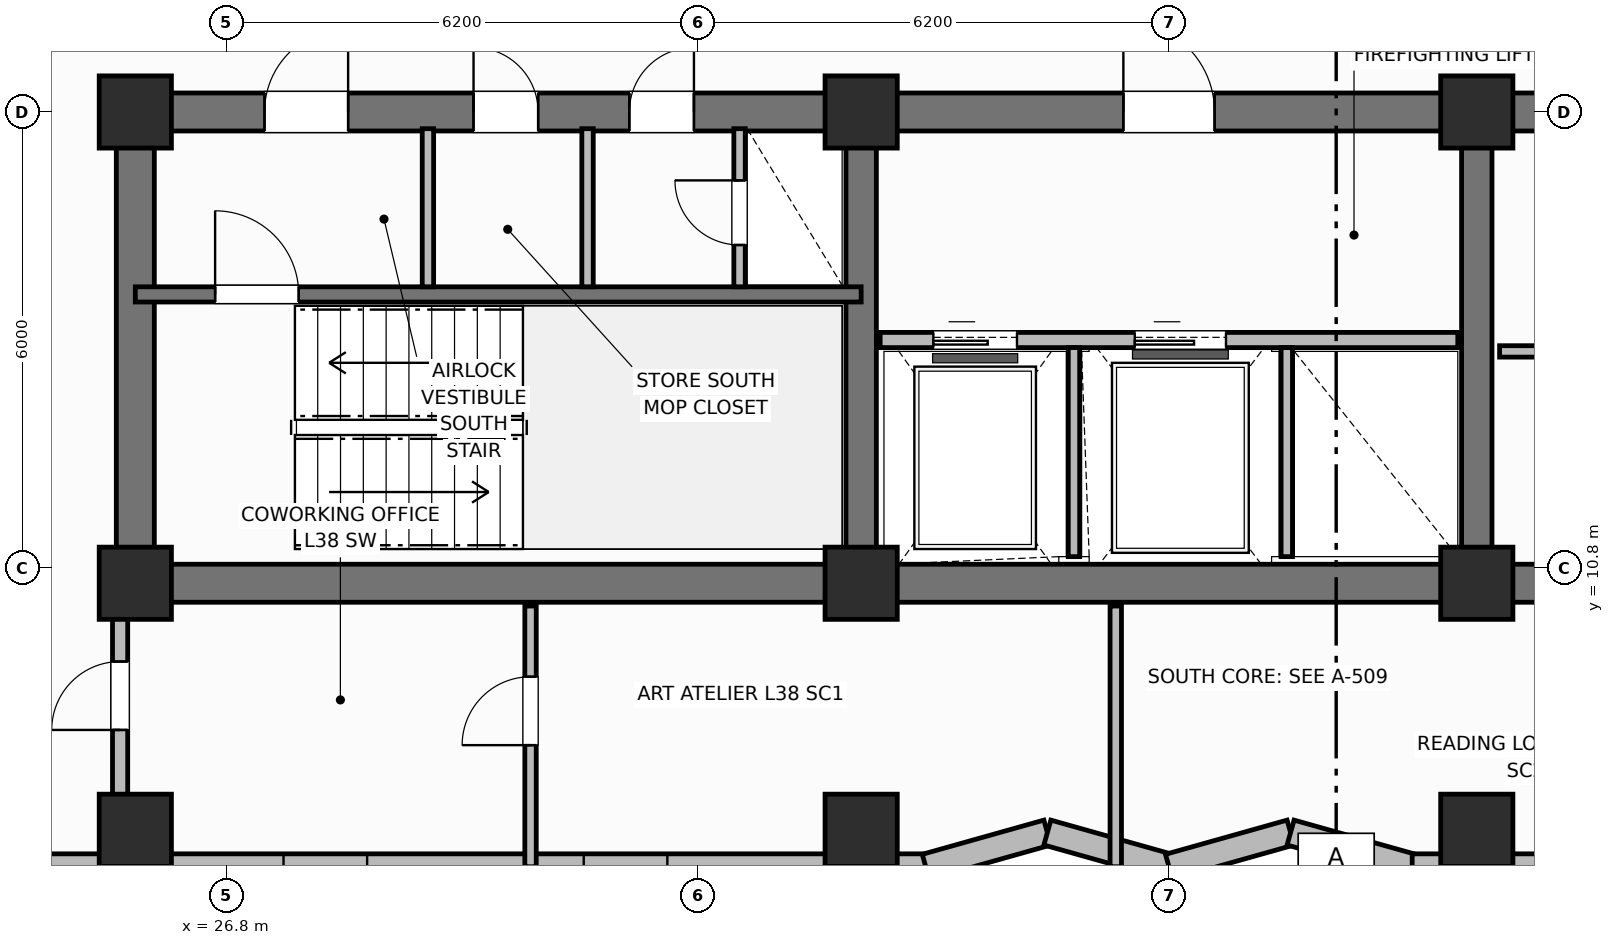
"""IFC4 building model, lengths in metres.
Left out: names, types, materials, properties, quantities, classifications, styles, units other than length and angle.
Written with IfcOpenShell. Run it as: python <this file> out.ifc"""

import sys

from ifc_helpers import new_model, si_unit, direction, frame, frame_2d, origin, origin_2d, place, context, subcontext, project, spatial, rectangle, extrude, element, fill, save


model = new_model("IFC4")
c1 = context("Model", 3, precision=1e-05, world=origin(), true_north=direction((0.0, 1.0)))
c2 = subcontext(c1, "Body", "Model", "MODEL_VIEW")
j1 = project(units=[si_unit("LENGTHUNIT", "METRE"), si_unit("PLANEANGLEUNIT", "RADIAN")], contexts=[c1])
p1 = place(None, origin())
s1 = spatial("IfcSite", under=j1, at=p1, CompositionType="ELEMENT")
p2 = place(p1, origin())
s2 = spatial("IfcBuilding", under=s1, at=p2, CompositionType="ELEMENT")
p3 = place(p2, frame((0.0, 0.0, 155.2)))
s3 = spatial("IfcBuildingStorey", under=s2, at=p3, CompositionType="ELEMENT", Elevation=155.2)
p4 = place(p3, frame((52.8, 10.6, 0.0), z_axis=(0.0, 0.0, 1.0), x_axis=(-1.0, 0.0, 0.0)))
e1 = element("IfcWall", 1, at=p4, inside=s3, PredefinedType="SHEAR", context=c2, shape_type="SweptSolid", body=[
    extrude(rectangle(XDim=27.2, YDim=0.5, at=frame_2d((13.6, 0.0))), origin(), (0.0, 0.0, 1.0), 3.7),
])
p5 = place(p3, frame((25.6, 10.85, 0.0), z_axis=(0.0, 0.0, 1.0), x_axis=(0.0, 1.0, 0.0)))
e2 = element("IfcWall", 2, at=p5, inside=s3, PredefinedType="SHEAR", context=c2, shape_type="SweptSolid", body=[
    extrude(rectangle(XDim=5.7, YDim=0.5, at=frame_2d((2.85, 0.0))), origin(), (0.0, 0.0, 1.0), 3.7),
])
p6 = place(p3, frame((25.6, 16.8, 0.0), z_axis=(0.0, 0.0, 1.0), x_axis=(1.0, 0.0, 0.0)))
e3 = element("IfcWall", 3, at=p6, inside=s3, PredefinedType="SHEAR", context=c2, shape_type="SweptSolid", body=[
    extrude(rectangle(XDim=27.2, YDim=0.5, at=frame_2d((13.6, 0.0))), origin(), (0.0, 0.0, 1.0), 3.7),
])
p7 = place(p6, frame((1.7, 0.0, 0.0)))
e4 = element("IfcOpeningElement", 4, at=p7, cuts=e3, PredefinedType="OPENING", context=c2, shape_type="SweptSolid", body=[
    extrude(rectangle(XDim=1.1, YDim=2.15, at=frame_2d((0.55, 1.075))), frame((0.0, 0.26, 0.0), z_axis=(0.0, -1.0, 0.0), x_axis=(1.0, 0.0, 0.0)), (0.0, 0.0, 1.0), 0.52),
])
p8 = place(p6, frame((4.45, 0.0, 0.0)))
e5 = element("IfcOpeningElement", 5, at=p8, cuts=e3, PredefinedType="OPENING", context=c2, shape_type="SweptSolid", body=[
    extrude(rectangle(XDim=0.85, YDim=2.1, at=frame_2d((0.425, 1.05))), frame((0.0, 0.26, 0.0), z_axis=(0.0, -1.0, 0.0), x_axis=(1.0, 0.0, 0.0)), (0.0, 0.0, 1.0), 0.52),
])
p9 = place(p6, frame((6.5, 0.0, 0.0)))
e6 = element("IfcOpeningElement", 6, at=p9, cuts=e3, PredefinedType="OPENING", context=c2, shape_type="SweptSolid", body=[
    extrude(rectangle(XDim=0.85, YDim=2.1, at=frame_2d((0.425, 1.05))), frame((0.0, 0.26, 0.0), z_axis=(0.0, -1.0, 0.0), x_axis=(1.0, 0.0, 0.0)), (0.0, 0.0, 1.0), 0.52),
])
p10 = place(p6, frame((13.0, 0.0, 0.0)))
e7 = element("IfcOpeningElement", 7, at=p10, cuts=e3, PredefinedType="OPENING", context=c2, shape_type="SweptSolid", body=[
    extrude(rectangle(XDim=1.2, YDim=2.15, at=frame_2d((0.6, 1.075))), frame((0.0, 0.26, 0.0), z_axis=(0.0, -1.0, 0.0), x_axis=(1.0, 0.0, 0.0)), (0.0, 0.0, 1.0), 0.52),
])
p11 = place(p6, frame((19.8, 0.0, 0.0)))
e8 = element("IfcOpeningElement", 8, at=p11, cuts=e3, PredefinedType="OPENING", context=c2, shape_type="SweptSolid", body=[
    extrude(rectangle(XDim=0.85, YDim=2.1, at=frame_2d((0.425, 1.05))), frame((0.0, 0.26, 0.0), z_axis=(0.0, -1.0, 0.0), x_axis=(1.0, 0.0, 0.0)), (0.0, 0.0, 1.0), 0.52),
])
p12 = place(p6, frame((24.2, 0.0, 0.0)))
e9 = element("IfcOpeningElement", 9, at=p12, cuts=e3, PredefinedType="OPENING", context=c2, shape_type="SweptSolid", body=[
    extrude(rectangle(XDim=0.85, YDim=2.1, at=frame_2d((0.425, 1.05))), frame((0.0, 0.26, 0.0), z_axis=(0.0, -1.0, 0.0), x_axis=(1.0, 0.0, 0.0)), (0.0, 0.0, 1.0), 0.52),
])
for number, where, z_axis, x_axis in (
    (10, (35.15, 10.85, 0.0), (0.0, 0.0, 1.0), (0.0, 1.0, 0.0)),
    (11, (43.25, 10.85, 0.0), (0.0, 0.0, 1.0), (0.0, 1.0, 0.0)),
):
    element("IfcWall", number, at=place(p3, frame(where, z_axis=z_axis, x_axis=x_axis)), inside=s3, PredefinedType="SHEAR", context=c2, shape_type="SweptSolid", body=[
        extrude(rectangle(XDim=5.7, YDim=0.4, at=frame_2d((2.85, 0.0))), origin(), (0.0, 0.0, 1.0), 3.7),
    ])
for number, where, z_axis, x_axis in (
    (12, (25.6, 10.6, 0.0), (0.0, 0.0, 1.0), (1.0, 0.0, 0.0)),
    (13, (25.6, 16.8, 0.0), (0.0, 0.0, 1.0), (1.0, 0.0, 0.0)),
    (14, (35.15, 10.6, 0.0), (0.0, 0.0, 1.0), (1.0, 0.0, 0.0)),
    (15, (35.15, 16.8, 0.0), (0.0, 0.0, 1.0), (1.0, 0.0, 0.0)),
    (16, (43.25, 10.6, 0.0), (0.0, 0.0, 1.0), (1.0, 0.0, 0.0)),
    (17, (43.25, 16.8, 0.0), (0.0, 0.0, 1.0), (1.0, 0.0, 0.0)),
    (18, (25.6, 7.35, 0.0), (0.0, 0.0, 1.0), (1.0, 0.0, 0.0)),
    (19, (35.15, 7.35, 0.0), (0.0, 0.0, 1.0), (1.0, 0.0, 0.0)),
    (20, (43.25, 7.35, 0.0), (0.0, 0.0, 1.0), (1.0, 0.0, 0.0)),
):
    element("IfcColumn", number, at=place(p3, frame(where, z_axis=z_axis, x_axis=x_axis)), inside=s3, PredefinedType="COLUMN", context=c2, shape_type="SweptSolid", body=[
        extrude(rectangle(XDim=0.95, YDim=0.95, at=origin_2d()), origin(), (0.0, 0.0, 1.0), 3.7),
    ])
p13 = place(p3, frame((20.2, 6.87, 0.0), z_axis=(0.0, 0.0, 1.0), x_axis=(1.0, 0.0, 0.0)))
e21 = element("IfcWall", 21, at=p13, inside=s3, PredefinedType="SOLIDWALL", context=c2, shape_type="SweptSolid", body=[
    extrude(rectangle(XDim=15.8, YDim=0.34, at=frame_2d((7.9, 0.0))), origin(), (0.0, 0.0, 1.0), 2.72),
])
p14 = place(p13, frame((1.55, 0.0, 0.95)))
e22 = element("IfcOpeningElement", 22, at=p14, cuts=e21, PredefinedType="OPENING", context=c2, shape_type="SweptSolid", body=[
    extrude(rectangle(XDim=1.1, YDim=1.65, at=frame_2d((0.55, 0.825))), frame((0.0, 0.18, 0.0), z_axis=(0.0, -1.0, 0.0), x_axis=(1.0, 0.0, 0.0)), (0.0, 0.0, 1.0), 0.36),
])
p15 = place(p13, frame((7.35, 0.0, 0.95)))
e23 = element("IfcOpeningElement", 23, at=p15, cuts=e21, PredefinedType="OPENING", context=c2, shape_type="SweptSolid", body=[
    extrude(rectangle(XDim=1.1, YDim=1.65, at=frame_2d((0.55, 0.825))), frame((0.0, 0.18, 0.0), z_axis=(0.0, -1.0, 0.0), x_axis=(1.0, 0.0, 0.0)), (0.0, 0.0, 1.0), 0.36),
])
p16 = place(p13, frame((11.3, 0.0, 0.95)))
e24 = element("IfcOpeningElement", 24, at=p16, cuts=e21, PredefinedType="OPENING", context=c2, shape_type="SweptSolid", body=[
    extrude(rectangle(XDim=1.1, YDim=1.65, at=frame_2d((0.55, 0.825))), frame((0.0, 0.18, 0.0), z_axis=(0.0, -1.0, 0.0), x_axis=(1.0, 0.0, 0.0)), (0.0, 0.0, 1.0), 0.36),
])
p17 = place(p3, frame((36.0, 6.87, 0.0), z_axis=(0.0, 0.0, 1.0), x_axis=(0.962662902433, 0.270703040766, 0.0)))
e25 = element("IfcWall", 25, at=p17, inside=s3, PredefinedType="SOLIDWALL", context=c2, shape_type="SweptSolid", body=[
    extrude(rectangle(XDim=1.662, YDim=0.34, at=frame_2d((0.831, 0.0))), origin(), (0.0, 0.0, 1.0), 2.72),
])
p18 = place(p3, frame((37.6, 7.32, 0.0), z_axis=(0.0, 0.0, 1.0), x_axis=(0.962652136636, -0.270741322725, 0.0)))
e26 = element("IfcWall", 26, at=p18, inside=s3, PredefinedType="SOLIDWALL", context=c2, shape_type="SweptSolid", body=[
    extrude(rectangle(XDim=1.662, YDim=0.34, at=frame_2d((0.831, 0.0))), origin(), (0.0, 0.0, 1.0), 2.72),
])
p19 = place(p3, frame((39.2, 6.87, 0.0), z_axis=(0.0, 0.0, 1.0), x_axis=(0.962662902433, 0.270703040766, 0.0)))
e27 = element("IfcWall", 27, at=p19, inside=s3, PredefinedType="SOLIDWALL", context=c2, shape_type="SweptSolid", body=[
    extrude(rectangle(XDim=1.662, YDim=0.34, at=frame_2d((0.831, 0.0))), origin(), (0.0, 0.0, 1.0), 2.72),
])
p20 = place(p3, frame((40.8, 7.32, 0.0), z_axis=(0.0, 0.0, 1.0), x_axis=(0.962652136636, -0.270741322725, 0.0)))
e28 = element("IfcWall", 28, at=p20, inside=s3, PredefinedType="SOLIDWALL", context=c2, shape_type="SweptSolid", body=[
    extrude(rectangle(XDim=1.662, YDim=0.34, at=frame_2d((0.831, 0.0))), origin(), (0.0, 0.0, 1.0), 2.72),
])
p21 = place(p3, frame((42.4, 6.87, 0.0), z_axis=(0.0, 0.0, 1.0), x_axis=(1.0, 0.0, 0.0)))
e29 = element("IfcWall", 29, at=p21, inside=s3, PredefinedType="SOLIDWALL", context=c2, shape_type="SweptSolid", body=[
    extrude(rectangle(XDim=15.8, YDim=0.34, at=frame_2d((7.9, 0.0))), origin(), (0.0, 0.0, 1.0), 2.72),
])
p22 = place(p21, frame((2.25, 0.0, 0.95)))
e30 = element("IfcOpeningElement", 30, at=p22, cuts=e29, PredefinedType="OPENING", context=c2, shape_type="SweptSolid", body=[
    extrude(rectangle(XDim=1.1, YDim=1.65, at=frame_2d((0.55, 0.825))), frame((0.0, 0.18, 0.0), z_axis=(0.0, -1.0, 0.0), x_axis=(1.0, 0.0, 0.0)), (0.0, 0.0, 1.0), 0.36),
])
p23 = place(p21, frame((5.15, 0.0, 0.95)))
e31 = element("IfcOpeningElement", 31, at=p23, cuts=e29, PredefinedType="OPENING", context=c2, shape_type="SweptSolid", body=[
    extrude(rectangle(XDim=1.1, YDim=1.65, at=frame_2d((0.55, 0.825))), frame((0.0, 0.18, 0.0), z_axis=(0.0, -1.0, 0.0), x_axis=(1.0, 0.0, 0.0)), (0.0, 0.0, 1.0), 0.36),
])
p24 = place(p21, frame((7.35, 0.0, 0.95)))
e32 = element("IfcOpeningElement", 32, at=p24, cuts=e29, PredefinedType="OPENING", context=c2, shape_type="SweptSolid", body=[
    extrude(rectangle(XDim=1.1, YDim=1.65, at=frame_2d((0.55, 0.825))), frame((0.0, 0.18, 0.0), z_axis=(0.0, -1.0, 0.0), x_axis=(1.0, 0.0, 0.0)), (0.0, 0.0, 1.0), 0.36),
])
p25 = place(p21, frame((13.15, 0.0, 0.95)))
e33 = element("IfcOpeningElement", 33, at=p25, cuts=e29, PredefinedType="OPENING", context=c2, shape_type="SweptSolid", body=[
    extrude(rectangle(XDim=1.1, YDim=1.65, at=frame_2d((0.55, 0.825))), frame((0.0, 0.18, 0.0), z_axis=(0.0, -1.0, 0.0), x_axis=(1.0, 0.0, 0.0)), (0.0, 0.0, 1.0), 0.36),
])
p26 = place(p3, frame((25.6, 14.4, 0.0), z_axis=(0.0, 0.0, 1.0), x_axis=(1.0, 0.0, 0.0)))
e34 = element("IfcWall", 34, at=p26, inside=s3, PredefinedType="SHEAR", context=c2, shape_type="SweptSolid", body=[
    extrude(rectangle(XDim=9.55, YDim=0.2, at=frame_2d((4.775, 0.0))), origin(), (0.0, 0.0, 1.0), 3.7),
])
p27 = place(p26, frame((1.05, 0.0, 0.0)))
e35 = element("IfcOpeningElement", 35, at=p27, cuts=e34, PredefinedType="OPENING", context=c2, shape_type="SweptSolid", body=[
    extrude(rectangle(XDim=1.1, YDim=2.15, at=frame_2d((0.55, 1.075))), frame((0.0, 0.11, 0.0), z_axis=(0.0, -1.0, 0.0), x_axis=(1.0, 0.0, 0.0)), (0.0, 0.0, 1.0), 0.22),
])
for number, where, z_axis, x_axis in (
    (36, (29.45, 14.5, 0.0), (0.0, 0.0, 1.0), (0.0, 1.0, 0.0)),
    (37, (31.55, 14.5, 0.0), (0.0, 0.0, 1.0), (0.0, 1.0, 0.0)),
):
    element("IfcWall", number, at=place(p3, frame(where, z_axis=z_axis, x_axis=x_axis)), inside=s3, PredefinedType="PARTITIONING", context=c2, shape_type="SweptSolid", body=[
        extrude(rectangle(XDim=2.08, YDim=0.15, at=frame_2d((1.04, 0.0))), origin(), (0.0, 0.0, 1.0), 2.55),
    ])
p28 = place(p3, frame((33.55, 14.5, 0.0), z_axis=(0.0, 0.0, 1.0), x_axis=(0.0, 1.0, 0.0)))
e38 = element("IfcWall", 38, at=p28, inside=s3, PredefinedType="PARTITIONING", context=c2, shape_type="SweptSolid", body=[
    extrude(rectangle(XDim=2.08, YDim=0.15, at=frame_2d((1.04, 0.0))), origin(), (0.0, 0.0, 1.0), 2.55),
])
p29 = place(p28, frame((0.55, 0.0, 0.0)))
e39 = element("IfcOpeningElement", 39, at=p29, cuts=e38, PredefinedType="OPENING", context=c2, shape_type="SweptSolid", body=[
    extrude(rectangle(XDim=0.85, YDim=2.05, at=frame_2d((0.425, 1.025))), frame((0.0, 0.085, 0.0), z_axis=(0.0, -1.0, 0.0), x_axis=(1.0, 0.0, 0.0)), (0.0, 0.0, 1.0), 0.17),
])
p30 = place(p3, frame((35.4, 13.8, 0.0), z_axis=(0.0, 0.0, 1.0), x_axis=(1.0, 0.0, 0.0)))
e40 = element("IfcWall", 40, at=p30, inside=s3, PredefinedType="PARTITIONING", context=c2, shape_type="SweptSolid", body=[
    extrude(rectangle(XDim=7.6, YDim=0.2, at=frame_2d((3.8, 0.0))), origin(), (0.0, 0.0, 1.0), 2.32),
])
p31 = place(p30, frame((0.7, 0.0, 0.0)))
e41 = element("IfcOpeningElement", 41, at=p31, cuts=e40, PredefinedType="OPENING", context=c2, shape_type="SweptSolid", body=[
    extrude(rectangle(XDim=1.1, YDim=2.15, at=frame_2d((0.55, 1.075))), frame((0.0, 0.11, 0.0), z_axis=(0.0, -1.0, 0.0), x_axis=(1.0, 0.0, 0.0)), (0.0, 0.0, 1.0), 0.22),
])
p32 = place(p30, frame((3.35, 0.0, 0.0)))
e42 = element("IfcOpeningElement", 42, at=p32, cuts=e40, PredefinedType="OPENING", context=c2, shape_type="SweptSolid", body=[
    extrude(rectangle(XDim=1.2, YDim=2.15, at=frame_2d((0.6, 1.075))), frame((0.0, 0.11, 0.0), z_axis=(0.0, -1.0, 0.0), x_axis=(1.0, 0.0, 0.0)), (0.0, 0.0, 1.0), 0.22),
])
for number, where, z_axis, x_axis in (
    (43, (37.95, 10.95, 0.0), (0.0, 0.0, 1.0), (0.0, 1.0, 0.0)),
    (44, (40.75, 10.95, 0.0), (0.0, 0.0, 1.0), (0.0, 1.0, 0.0)),
):
    element("IfcWall", number, at=place(p3, frame(where, z_axis=z_axis, x_axis=x_axis)), inside=s3, PredefinedType="PARTITIONING", context=c2, shape_type="SweptSolid", body=[
        extrude(rectangle(XDim=2.75, YDim=0.15, at=frame_2d((1.375, 0.0))), origin(), (0.0, 0.0, 1.0), 2.55),
    ])
p33 = place(p3, frame((43.55, 13.65, 0.0), z_axis=(0.0, 0.0, 1.0), x_axis=(1.0, 0.0, 0.0)))
e45 = element("IfcWall", 45, at=p33, inside=s3, PredefinedType="PARTITIONING", context=c2, shape_type="SweptSolid", body=[
    extrude(rectangle(XDim=4.4, YDim=0.15, at=frame_2d((2.2, 0.0))), origin(), (0.0, 0.0, 1.0), 2.55),
])
p34 = place(p33, frame((1.6, 0.0, 0.0)))
e46 = element("IfcOpeningElement", 46, at=p34, cuts=e45, PredefinedType="OPENING", context=c2, shape_type="SweptSolid", body=[
    extrude(rectangle(XDim=0.85, YDim=2.1, at=frame_2d((0.425, 1.05))), frame((0.0, 0.085, 0.0), z_axis=(0.0, -1.0, 0.0), x_axis=(1.0, 0.0, 0.0)), (0.0, 0.0, 1.0), 0.17),
])
p35 = place(p3, frame((30.8, 6.87, 0.0), z_axis=(0.0, 0.0, 1.0), x_axis=(0.0, 1.0, 0.0)))
e47 = element("IfcWall", 47, at=p35, inside=s3, PredefinedType="PARTITIONING", context=c2, shape_type="SweptSolid", body=[
    extrude(rectangle(XDim=3.43, YDim=0.15, at=frame_2d((1.715, 0.0))), origin(), (0.0, 0.0, 1.0), 2.55),
])
p36 = place(p35, frame((1.6, 0.0, 0.0)))
e48 = element("IfcOpeningElement", 48, at=p36, cuts=e47, PredefinedType="OPENING", context=c2, shape_type="SweptSolid", body=[
    extrude(rectangle(XDim=0.9, YDim=2.1, at=frame_2d((0.45, 1.05))), frame((0.0, 0.085, 0.0), z_axis=(0.0, -1.0, 0.0), x_axis=(1.0, 0.0, 0.0)), (0.0, 0.0, 1.0), 0.17),
])
p37 = place(p3, frame((38.5, 6.87, 0.0), z_axis=(0.0, 0.0, 1.0), x_axis=(0.0, 1.0, 0.0)))
e49 = element("IfcWall", 49, at=p37, inside=s3, PredefinedType="PARTITIONING", context=c2, shape_type="SweptSolid", body=[
    extrude(rectangle(XDim=3.43, YDim=0.15, at=frame_2d((1.715, 0.0))), origin(), (0.0, 0.0, 1.0), 2.55),
])
p38 = place(p3, frame((25.4, 7.82, 0.0), z_axis=(0.0, 0.0, 1.0), x_axis=(0.0, 1.0, 0.0)))
e50 = element("IfcWall", 50, at=p38, inside=s3, PredefinedType="PARTITIONING", context=c2, shape_type="SweptSolid", body=[
    extrude(rectangle(XDim=2.48, YDim=0.2, at=frame_2d((1.24, 0.0))), origin(), (0.0, 0.0, 1.0), 2.55),
])
p39 = place(p38, frame((0.85, 0.0, 0.0)))
e51 = element("IfcOpeningElement", 51, at=p39, cuts=e50, PredefinedType="OPENING", context=c2, shape_type="SweptSolid", body=[
    extrude(rectangle(XDim=0.9, YDim=2.1, at=frame_2d((0.45, 1.05))), frame((0.0, 0.11, 0.0), z_axis=(0.0, -1.0, 0.0), x_axis=(1.0, 0.0, 0.0)), (0.0, 0.0, 1.0), 0.22),
])
p40 = place(p15, origin())
e52 = element("IfcWindow", 52, at=p40, inside=s3, PartitioningType="SINGLE_PANEL", PredefinedType="WINDOW", context=c2, shape_type="SweptSolid", body=[
    extrude(rectangle(XDim=1.1, YDim=1.65, at=frame_2d((0.55, 0.825))), frame((0.0, 0.03, 0.0), z_axis=(0.0, -1.0, 0.0), x_axis=(1.0, 0.0, 0.0)), (0.0, 0.0, 1.0), 0.06),
])
fill(e23, e52)
p41 = place(p16, origin())
e53 = element("IfcWindow", 53, at=p41, inside=s3, PartitioningType="SINGLE_PANEL", PredefinedType="WINDOW", context=c2, shape_type="SweptSolid", body=[
    extrude(rectangle(XDim=1.1, YDim=1.65, at=frame_2d((0.55, 0.825))), frame((0.0, 0.03, 0.0), z_axis=(0.0, -1.0, 0.0), x_axis=(1.0, 0.0, 0.0)), (0.0, 0.0, 1.0), 0.06),
])
fill(e24, e53)
p42 = place(p27, origin())
e54 = element("IfcDoor", 54, at=p42, inside=s3, OperationType="SINGLE_SWING_LEFT", PredefinedType="DOOR", context=c2, shape_type="SweptSolid", body=[
    extrude(rectangle(XDim=1.1, YDim=2.15, at=frame_2d((0.55, 1.075))), frame((0.0, 0.025, 0.0), z_axis=(0.0, -1.0, 0.0), x_axis=(1.0, 0.0, 0.0)), (0.0, 0.0, 1.0), 0.05),
])
fill(e35, e54)
p43 = place(p29, origin())
e55 = element("IfcDoor", 55, at=p43, inside=s3, OperationType="SINGLE_SWING_RIGHT", PredefinedType="TRAPDOOR", context=c2, shape_type="SweptSolid", body=[
    extrude(rectangle(XDim=0.85, YDim=2.05, at=frame_2d((0.425, 1.025))), frame((0.0, 0.025, 0.0), z_axis=(0.0, -1.0, 0.0), x_axis=(1.0, 0.0, 0.0)), (0.0, 0.0, 1.0), 0.05),
])
fill(e39, e55)
p44 = place(p31, origin())
e56 = element("IfcDoor", 56, at=p44, inside=s3, OperationType="SLIDING_TO_LEFT", PredefinedType="DOOR", context=c2, shape_type="SweptSolid", body=[
    extrude(rectangle(XDim=1.1, YDim=2.15, at=frame_2d((0.55, 1.075))), frame((0.0, 0.025, 0.0), z_axis=(0.0, -1.0, 0.0), x_axis=(1.0, 0.0, 0.0)), (0.0, 0.0, 1.0), 0.05),
])
fill(e41, e56)
p45 = place(p32, origin())
e57 = element("IfcDoor", 57, at=p45, inside=s3, OperationType="SLIDING_TO_LEFT", PredefinedType="DOOR", context=c2, shape_type="SweptSolid", body=[
    extrude(rectangle(XDim=1.2, YDim=2.15, at=frame_2d((0.6, 1.075))), frame((0.0, 0.025, 0.0), z_axis=(0.0, -1.0, 0.0), x_axis=(1.0, 0.0, 0.0)), (0.0, 0.0, 1.0), 0.05),
])
fill(e42, e57)
p46 = place(p36, origin())
e58 = element("IfcDoor", 58, at=p46, inside=s3, OperationType="SINGLE_SWING_LEFT", PredefinedType="DOOR", context=c2, shape_type="SweptSolid", body=[
    extrude(rectangle(XDim=0.9, YDim=2.1, at=frame_2d((0.45, 1.05))), frame((0.0, 0.025, 0.0), z_axis=(0.0, -1.0, 0.0), x_axis=(1.0, 0.0, 0.0)), (0.0, 0.0, 1.0), 0.05),
])
fill(e48, e58)
p47 = place(p39, origin())
e59 = element("IfcDoor", 59, at=p47, inside=s3, OperationType="SINGLE_SWING_LEFT", PredefinedType="DOOR", context=c2, shape_type="SweptSolid", body=[
    extrude(rectangle(XDim=0.9, YDim=2.1, at=frame_2d((0.45, 1.05))), frame((0.0, 0.025, 0.0), z_axis=(0.0, -1.0, 0.0), x_axis=(1.0, 0.0, 0.0)), (0.0, 0.0, 1.0), 0.05),
])
fill(e51, e59)
p48 = place(p7, origin())
e60 = element("IfcDoor", 60, at=p48, inside=s3, OperationType="SINGLE_SWING_RIGHT", PredefinedType="DOOR", context=c2, shape_type="SweptSolid", body=[
    extrude(rectangle(XDim=1.1, YDim=2.15, at=frame_2d((0.55, 1.075))), frame((0.0, 0.025, 0.0), z_axis=(0.0, -1.0, 0.0), x_axis=(1.0, 0.0, 0.0)), (0.0, 0.0, 1.0), 0.05),
])
fill(e4, e60)
p49 = place(p8, origin())
e61 = element("IfcDoor", 61, at=p49, inside=s3, OperationType="SINGLE_SWING_LEFT", PredefinedType="DOOR", context=c2, shape_type="SweptSolid", body=[
    extrude(rectangle(XDim=0.85, YDim=2.1, at=frame_2d((0.425, 1.05))), frame((0.0, 0.025, 0.0), z_axis=(0.0, -1.0, 0.0), x_axis=(1.0, 0.0, 0.0)), (0.0, 0.0, 1.0), 0.05),
])
fill(e5, e61)
p50 = place(p9, origin())
e62 = element("IfcDoor", 62, at=p50, inside=s3, OperationType="SINGLE_SWING_RIGHT", PredefinedType="DOOR", context=c2, shape_type="SweptSolid", body=[
    extrude(rectangle(XDim=0.85, YDim=2.1, at=frame_2d((0.425, 1.05))), frame((0.0, 0.025, 0.0), z_axis=(0.0, -1.0, 0.0), x_axis=(1.0, 0.0, 0.0)), (0.0, 0.0, 1.0), 0.05),
])
fill(e6, e62)
p51 = place(p10, origin())
e63 = element("IfcDoor", 63, at=p51, inside=s3, OperationType="SINGLE_SWING_LEFT", PredefinedType="DOOR", context=c2, shape_type="SweptSolid", body=[
    extrude(rectangle(XDim=1.2, YDim=2.15, at=frame_2d((0.6, 1.075))), frame((0.0, 0.025, 0.0), z_axis=(0.0, -1.0, 0.0), x_axis=(1.0, 0.0, 0.0)), (0.0, 0.0, 1.0), 0.05),
])
fill(e7, e63)
save(model, sys.argv[1])
